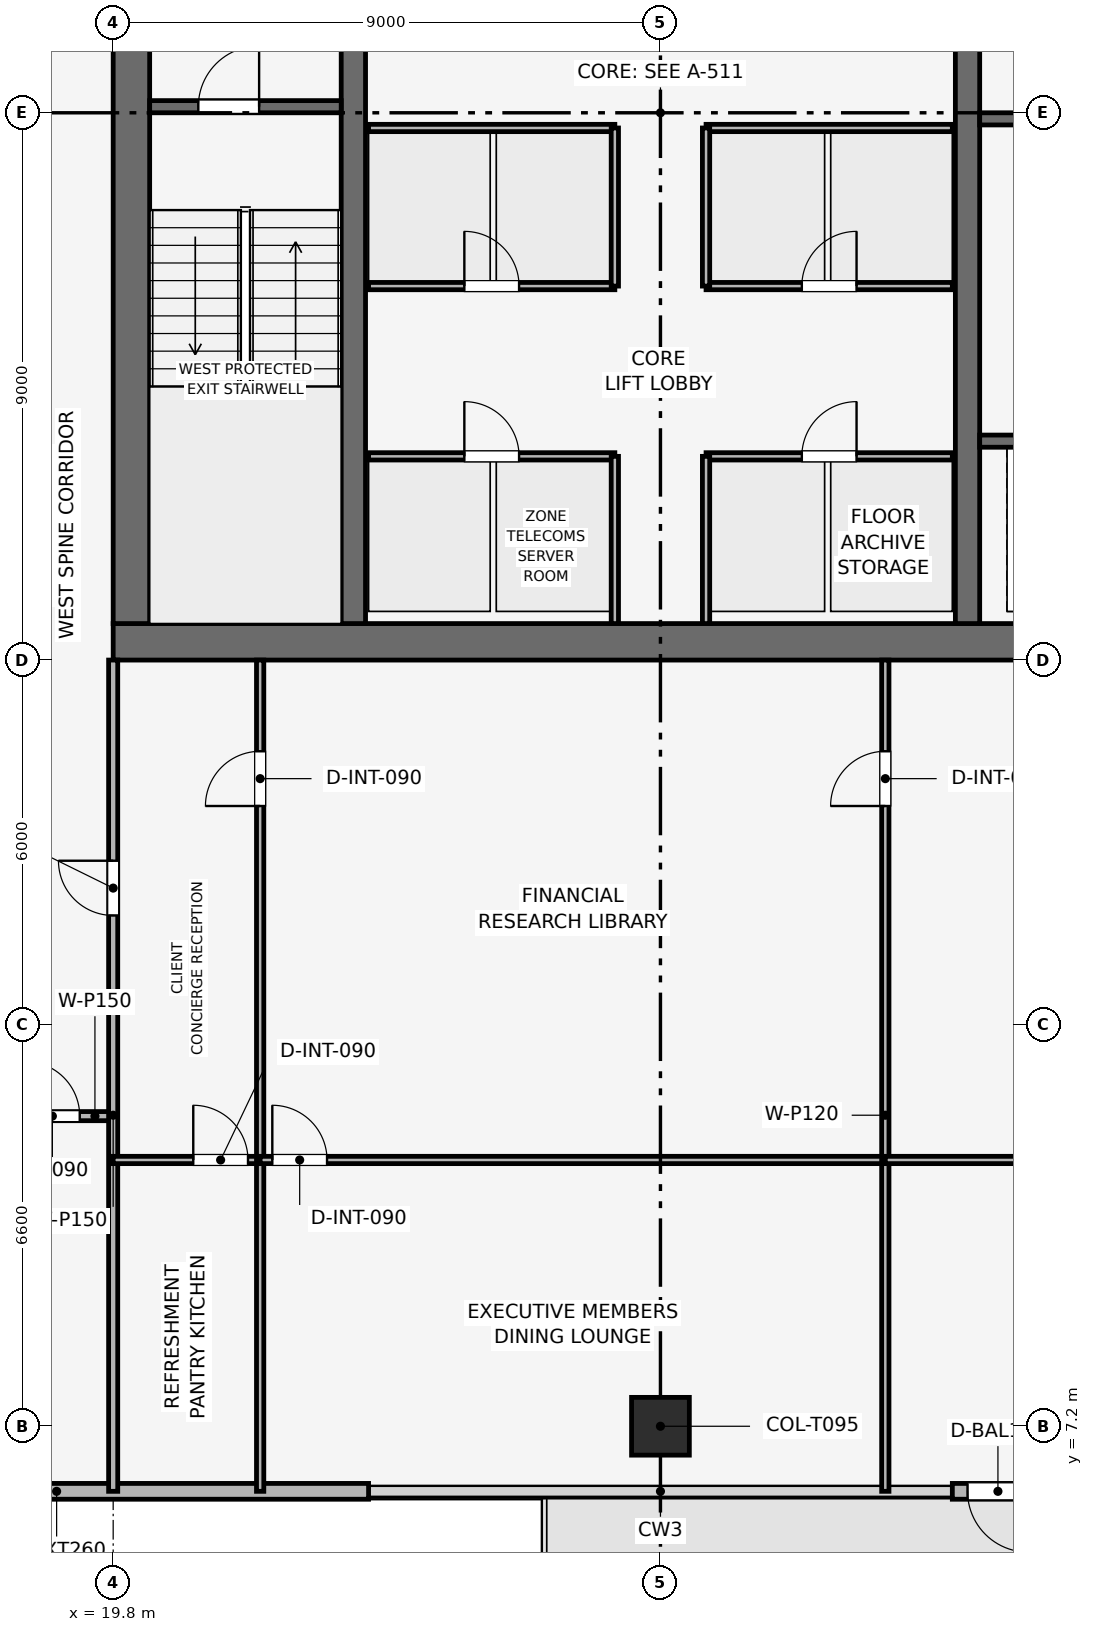
"""IFC4 building model, lengths in metres.
Left out: names, types, materials, properties, quantities, classifications, styles, units other than length and angle.
Written with IfcOpenShell. Run it as: python <this file> out.ifc"""

import sys

from ifc_helpers import new_model, si_unit, direction, frame, frame_2d, origin, origin_2d, place, context, subcontext, project, spatial, rectangle, extrude, element, fill, save


model = new_model("IFC4")
c1 = context("Model", 3, precision=1e-05, world=origin(), true_north=direction((0.0, 1.0)))
c2 = subcontext(c1, "Body", "Model", "MODEL_VIEW")
j1 = project(units=[si_unit("LENGTHUNIT", "METRE"), si_unit("PLANEANGLEUNIT", "RADIAN")], contexts=[c1])
p1 = place(None, origin())
s1 = spatial("IfcSite", under=j1, at=p1, CompositionType="ELEMENT")
p2 = place(p1, origin())
s2 = spatial("IfcBuilding", under=s1, at=p2, CompositionType="ELEMENT")
p3 = place(p2, frame((0.0, 0.0, 310.5)))
s3 = spatial("IfcBuildingStorey", under=s2, at=p3, CompositionType="ELEMENT", Elevation=310.5)
p4 = place(p3, frame((19.8, 20.1, 0.0), z_axis=(0.0, 0.0, 1.0), x_axis=(1.0, 0.0, 0.0)))
e1 = element("IfcWall", 1, at=p4, inside=s3, PredefinedType="SHEAR", context=c2, shape_type="SweptSolid", body=[
    extrude(rectangle(XDim=18.0, YDim=0.6, at=frame_2d((9.0, 0.0))), origin(), (0.0, 0.0, 1.0), 3.75),
])
p5 = place(p3, frame((20.1, 20.4, 0.0), z_axis=(0.0, 0.0, 1.0), x_axis=(0.0, 1.0, 0.0)))
e2 = element("IfcWall", 2, at=p5, inside=s3, PredefinedType="SHEAR", context=c2, shape_type="SweptSolid", body=[
    extrude(rectangle(XDim=16.8, YDim=0.6, at=frame_2d((8.4, 0.0))), origin(), (0.0, 0.0, 1.0), 3.75),
])
p6 = place(p5, frame((10.4, 0.0, 0.0)))
e3 = element("IfcOpeningElement", 3, at=p6, cuts=e2, PredefinedType="OPENING", context=c2, shape_type="SweptSolid", body=[
    extrude(rectangle(XDim=1.1, YDim=2.15, at=frame_2d((0.55, 1.075))), frame((0.0, 0.31, 0.0), z_axis=(0.0, -1.0, 0.0), x_axis=(1.0, 0.0, 0.0)), (0.0, 0.0, 1.0), 0.62),
])
for number, where, z_axis, x_axis in (
    (4, (23.75, 20.4, 0.0), (0.0, 0.0, 1.0), (0.0, 1.0, 0.0)),
    (5, (33.85, 20.4, 0.0), (0.0, 0.0, 1.0), (0.0, 1.0, 0.0)),
):
    element("IfcWall", number, at=place(p3, frame(where, z_axis=z_axis, x_axis=x_axis)), inside=s3, PredefinedType="SHEAR", context=c2, shape_type="SweptSolid", body=[
        extrude(rectangle(XDim=16.8, YDim=0.4, at=frame_2d((8.4, 0.0))), origin(), (0.0, 0.0, 1.0), 3.75),
    ])
p7 = place(p3, frame((28.8, 7.2, 0.003), z_axis=(0.0, 0.0, 1.0), x_axis=(1.0, 0.0, 0.0)))
e6 = element("IfcColumn", 6, at=p7, inside=s3, PredefinedType="COLUMN", context=c2, shape_type="SweptSolid", body=[
    extrude(rectangle(XDim=0.95, YDim=0.95, at=origin_2d()), origin(), (0.0, 0.0, 1.0), 3.504),
])
p8 = place(p3, frame((45.3, 6.13, 0.0), z_axis=(0.0, 0.0, 1.0), x_axis=(-1.0, 0.0, 0.0)))
e7 = element("IfcWall", 7, at=p8, inside=s3, PredefinedType="SOLIDWALL", context=c2, shape_type="SweptSolid", body=[
    extrude(rectangle(XDim=11.7, YDim=0.26, at=frame_2d((5.85, 0.0))), origin(), (0.0, 0.0, 1.0), 3.51),
])
p9 = place(p8, frame((10.45, 0.0, 0.0)))
e8 = element("IfcOpeningElement", 8, at=p9, cuts=e7, PredefinedType="OPENING", context=c2, shape_type="SweptSolid", body=[
    extrude(rectangle(XDim=1.0, YDim=2.2, at=frame_2d((0.5, 1.1))), frame((0.0, 0.14, 0.0), z_axis=(0.0, -1.0, 0.0), x_axis=(1.0, 0.0, 0.0)), (0.0, 0.0, 1.0), 0.28),
])
p10 = place(p3, frame((24.0, 6.13, 0.0), z_axis=(0.0, 0.0, 1.0), x_axis=(-1.0, 0.0, 0.0)))
e9 = element("IfcWall", 9, at=p10, inside=s3, PredefinedType="SOLIDWALL", context=c2, shape_type="SweptSolid", body=[
    extrude(rectangle(XDim=11.7, YDim=0.26, at=frame_2d((5.85, 0.0))), origin(), (0.0, 0.0, 1.0), 3.51),
])
p11 = place(p10, frame((5.964, 0.0, 0.9)))
e10 = element("IfcOpeningElement", 10, at=p11, cuts=e9, PredefinedType="OPENING", context=c2, shape_type="SweptSolid", body=[
    extrude(rectangle(XDim=1.2, YDim=2.1, at=frame_2d((0.6, 1.05))), frame((0.0, 0.14, 0.0), z_axis=(0.0, -1.0, 0.0), x_axis=(1.0, 0.0, 0.0)), (0.0, 0.0, 1.0), 0.28),
])
p12 = place(p3, frame((20.4, 28.9, 0.0), z_axis=(0.0, 0.0, 1.0), x_axis=(1.0, 0.0, 0.0)))
e11 = element("IfcWall", 11, at=p12, inside=s3, PredefinedType="SHEAR", context=c2, shape_type="SweptSolid", body=[
    extrude(rectangle(XDim=3.15, YDim=0.2, at=frame_2d((1.575, 0.0))), origin(), (0.0, 0.0, 1.0), 3.51),
])
p13 = place(p12, frame((0.8, 0.0, 0.0)))
e12 = element("IfcOpeningElement", 12, at=p13, cuts=e11, PredefinedType="OPENING", context=c2, shape_type="SweptSolid", body=[
    extrude(rectangle(XDim=1.0, YDim=2.1, at=frame_2d((0.5, 1.05))), frame((0.0, 0.11, 0.0), z_axis=(0.0, -1.0, 0.0), x_axis=(1.0, 0.0, 0.0)), (0.0, 0.0, 1.0), 0.22),
])
p14 = place(p3, frame((34.05, 28.7, 0.0), z_axis=(0.0, 0.0, 1.0), x_axis=(1.0, 0.0, 0.0)))
e13 = element("IfcWall", 13, at=p14, inside=s3, PredefinedType="SHEAR", context=c2, shape_type="SweptSolid", body=[
    extrude(rectangle(XDim=3.15, YDim=0.2, at=frame_2d((1.575, 0.0))), origin(), (0.0, 0.0, 1.0), 3.51),
])
p15 = place(p14, frame((0.8, 0.0, 0.0)))
e14 = element("IfcOpeningElement", 14, at=p15, cuts=e13, PredefinedType="OPENING", context=c2, shape_type="SweptSolid", body=[
    extrude(rectangle(XDim=1.0, YDim=2.1, at=frame_2d((0.5, 1.05))), frame((0.0, 0.11, 0.0), z_axis=(0.0, -1.0, 0.0), x_axis=(1.0, 0.0, 0.0)), (0.0, 0.0, 1.0), 0.22),
])
p16 = place(p3, frame((34.05, 23.4, 0.0), z_axis=(0.0, 0.0, 1.0), x_axis=(1.0, 0.0, 0.0)))
e15 = element("IfcWall", 15, at=p16, inside=s3, PredefinedType="SHEAR", context=c2, shape_type="SweptSolid", body=[
    extrude(rectangle(XDim=3.05, YDim=0.2, at=frame_2d((1.525, 0.0))), origin(), (0.0, 0.0, 1.0), 3.51),
])
p17 = place(p16, frame((1.2, 0.0, 0.0)))
e16 = element("IfcOpeningElement", 16, at=p17, cuts=e15, PredefinedType="OPENING", context=c2, shape_type="SweptSolid", body=[
    extrude(rectangle(XDim=1.1, YDim=2.15, at=frame_2d((0.55, 1.075))), frame((0.0, 0.11, 0.0), z_axis=(0.0, -1.0, 0.0), x_axis=(1.0, 0.0, 0.0)), (0.0, 0.0, 1.0), 0.22),
])
p18 = place(p3, frame((24.0, 23.15, 0.0), z_axis=(0.0, 0.0, 1.0), x_axis=(1.0, 0.0, 0.0)))
e17 = element("IfcWall", 17, at=p18, inside=s3, PredefinedType="PARTITIONING", context=c2, shape_type="SweptSolid", body=[
    extrude(rectangle(XDim=4.05, YDim=0.12, at=frame_2d((2.025, 0.0))), origin(), (0.0, 0.0, 1.0), 3.51),
])
p19 = place(p18, frame((1.575, 0.0, 0.0)))
e18 = element("IfcOpeningElement", 18, at=p19, cuts=e17, PredefinedType="OPENING", context=c2, shape_type="SweptSolid", body=[
    extrude(rectangle(XDim=0.9, YDim=2.1, at=frame_2d((0.45, 1.05))), frame((0.0, 0.07, 0.0), z_axis=(0.0, -1.0, 0.0), x_axis=(1.0, 0.0, 0.0)), (0.0, 0.0, 1.0), 0.14),
])
p20 = place(p3, frame((28.05, 20.4, 0.0), z_axis=(0.0, 0.0, 1.0), x_axis=(0.0, 1.0, 0.0)))
e19 = element("IfcWall", 19, at=p20, inside=s3, PredefinedType="PARTITIONING", context=c2, shape_type="SweptSolid", body=[
    extrude(rectangle(XDim=2.75, YDim=0.12, at=frame_2d((1.375, 0.0))), origin(), (0.0, 0.0, 1.0), 3.51),
])
p21 = place(p3, frame((29.55, 23.15, 0.0), z_axis=(0.0, 0.0, 1.0), x_axis=(1.0, 0.0, 0.0)))
e20 = element("IfcWall", 20, at=p21, inside=s3, PredefinedType="PARTITIONING", context=c2, shape_type="SweptSolid", body=[
    extrude(rectangle(XDim=4.05, YDim=0.12, at=frame_2d((2.025, 0.0))), origin(), (0.0, 0.0, 1.0), 3.51),
])
p22 = place(p21, frame((1.575, 0.0, 0.0)))
e21 = element("IfcOpeningElement", 21, at=p22, cuts=e20, PredefinedType="OPENING", context=c2, shape_type="SweptSolid", body=[
    extrude(rectangle(XDim=0.9, YDim=2.1, at=frame_2d((0.45, 1.05))), frame((0.0, 0.07, 0.0), z_axis=(0.0, -1.0, 0.0), x_axis=(1.0, 0.0, 0.0)), (0.0, 0.0, 1.0), 0.14),
])
p23 = place(p3, frame((29.55, 20.4, 0.0), z_axis=(0.0, 0.0, 1.0), x_axis=(0.0, 1.0, 0.0)))
e22 = element("IfcWall", 22, at=p23, inside=s3, PredefinedType="PARTITIONING", context=c2, shape_type="SweptSolid", body=[
    extrude(rectangle(XDim=2.75, YDim=0.12, at=frame_2d((1.375, 0.0))), origin(), (0.0, 0.0, 1.0), 3.51),
])
p24 = place(p3, frame((24.0, 25.95, 0.0), z_axis=(0.0, 0.0, 1.0), x_axis=(1.0, 0.0, 0.0)))
e23 = element("IfcWall", 23, at=p24, inside=s3, PredefinedType="PARTITIONING", context=c2, shape_type="SweptSolid", body=[
    extrude(rectangle(XDim=4.05, YDim=0.12, at=frame_2d((2.025, 0.0))), origin(), (0.0, 0.0, 1.0), 3.51),
])
p25 = place(p24, frame((1.575, 0.0, 0.0)))
e24 = element("IfcOpeningElement", 24, at=p25, cuts=e23, PredefinedType="OPENING", context=c2, shape_type="SweptSolid", body=[
    extrude(rectangle(XDim=0.9, YDim=2.1, at=frame_2d((0.45, 1.05))), frame((0.0, 0.07, 0.0), z_axis=(0.0, -1.0, 0.0), x_axis=(1.0, 0.0, 0.0)), (0.0, 0.0, 1.0), 0.14),
])
p26 = place(p3, frame((24.0, 28.55, 0.0), z_axis=(0.0, 0.0, 1.0), x_axis=(1.0, 0.0, 0.0)))
e25 = element("IfcWall", 25, at=p26, inside=s3, PredefinedType="PARTITIONING", context=c2, shape_type="SweptSolid", body=[
    extrude(rectangle(XDim=4.05, YDim=0.12, at=frame_2d((2.025, 0.0))), origin(), (0.0, 0.0, 1.0), 3.51),
])
p27 = place(p3, frame((28.05, 25.95, 0.0), z_axis=(0.0, 0.0, 1.0), x_axis=(0.0, 1.0, 0.0)))
e26 = element("IfcWall", 26, at=p27, inside=s3, PredefinedType="PARTITIONING", context=c2, shape_type="SweptSolid", body=[
    extrude(rectangle(XDim=2.6, YDim=0.12, at=frame_2d((1.3, 0.0))), origin(), (0.0, 0.0, 1.0), 3.51),
])
p28 = place(p3, frame((29.55, 25.95, 0.0), z_axis=(0.0, 0.0, 1.0), x_axis=(1.0, 0.0, 0.0)))
e27 = element("IfcWall", 27, at=p28, inside=s3, PredefinedType="PARTITIONING", context=c2, shape_type="SweptSolid", body=[
    extrude(rectangle(XDim=4.05, YDim=0.12, at=frame_2d((2.025, 0.0))), origin(), (0.0, 0.0, 1.0), 3.51),
])
p29 = place(p28, frame((1.575, 0.0, 0.0)))
e28 = element("IfcOpeningElement", 28, at=p29, cuts=e27, PredefinedType="OPENING", context=c2, shape_type="SweptSolid", body=[
    extrude(rectangle(XDim=0.9, YDim=2.1, at=frame_2d((0.45, 1.05))), frame((0.0, 0.07, 0.0), z_axis=(0.0, -1.0, 0.0), x_axis=(1.0, 0.0, 0.0)), (0.0, 0.0, 1.0), 0.14),
])
p30 = place(p3, frame((29.55, 28.55, 0.0), z_axis=(0.0, 0.0, 1.0), x_axis=(1.0, 0.0, 0.0)))
e29 = element("IfcWall", 29, at=p30, inside=s3, PredefinedType="PARTITIONING", context=c2, shape_type="SweptSolid", body=[
    extrude(rectangle(XDim=4.05, YDim=0.12, at=frame_2d((2.025, 0.0))), origin(), (0.0, 0.0, 1.0), 3.51),
])
p31 = place(p3, frame((29.55, 25.95, 0.0), z_axis=(0.0, 0.0, 1.0), x_axis=(0.0, 1.0, 0.0)))
e30 = element("IfcWall", 30, at=p31, inside=s3, PredefinedType="PARTITIONING", context=c2, shape_type="SweptSolid", body=[
    extrude(rectangle(XDim=2.6, YDim=0.12, at=frame_2d((1.3, 0.0))), origin(), (0.0, 0.0, 1.0), 3.51),
])
p32 = place(p3, frame((17.9, 12.3, 0.0), z_axis=(0.0, 0.0, 1.0), x_axis=(1.0, 0.0, 0.0)))
e31 = element("IfcWall", 31, at=p32, inside=s3, PredefinedType="PARTITIONING", context=c2, shape_type="SweptSolid", body=[
    extrude(rectangle(XDim=1.9, YDim=0.15, at=frame_2d((0.95, 0.0))), origin(), (0.0, 0.0, 1.0), 3.51),
])
p33 = place(p32, frame((0.45, 0.0, 0.0)))
e32 = element("IfcOpeningElement", 32, at=p33, cuts=e31, PredefinedType="OPENING", context=c2, shape_type="SweptSolid", body=[
    extrude(rectangle(XDim=0.9, YDim=2.1, at=frame_2d((0.45, 1.05))), frame((0.0, 0.085, 0.0), z_axis=(0.0, -1.0, 0.0), x_axis=(1.0, 0.0, 0.0)), (0.0, 0.0, 1.0), 0.17),
])
p34 = place(p3, frame((19.8, 6.13, 0.0), z_axis=(0.0, 0.0, 1.0), x_axis=(0.0, 1.0, 0.0)))
e33 = element("IfcWall", 33, at=p34, inside=s3, PredefinedType="PARTITIONING", context=c2, shape_type="SweptSolid", body=[
    extrude(rectangle(XDim=13.67, YDim=0.15, at=frame_2d((6.835, 0.0))), origin(), (0.0, 0.0, 1.0), 3.095),
])
p35 = place(p34, frame((9.47, 0.0, 0.0)))
e34 = element("IfcOpeningElement", 34, at=p35, cuts=e33, PredefinedType="OPENING", context=c2, shape_type="SweptSolid", body=[
    extrude(rectangle(XDim=0.9, YDim=2.1, at=frame_2d((0.45, 1.05))), frame((0.0, 0.085, 0.0), z_axis=(0.0, -1.0, 0.0), x_axis=(1.0, 0.0, 0.0)), (0.0, 0.0, 1.0), 0.17),
])
p36 = place(p3, frame((19.8, 11.579, 0.0), z_axis=(0.0, 0.0, 1.0), x_axis=(1.0, 0.0, 0.0)))
e35 = element("IfcWall", 35, at=p36, inside=s3, PredefinedType="PARTITIONING", context=c2, shape_type="SweptSolid", body=[
    extrude(rectangle(XDim=2.417, YDim=0.12, at=frame_2d((1.208, 0.0))), origin(), (0.0, 0.0, 1.0), 3.095),
])
p37 = place(p36, frame((1.317, 0.0, 0.0)))
e36 = element("IfcOpeningElement", 36, at=p37, cuts=e35, PredefinedType="OPENING", context=c2, shape_type="SweptSolid", body=[
    extrude(rectangle(XDim=0.9, YDim=2.1, at=frame_2d((0.45, 1.05))), frame((0.0, 0.07, 0.0), z_axis=(0.0, -1.0, 0.0), x_axis=(1.0, 0.0, 0.0)), (0.0, 0.0, 1.0), 0.14),
])
p38 = place(p3, frame((22.217, 6.13, 0.0), z_axis=(0.0, 0.0, 1.0), x_axis=(0.0, 1.0, 0.0)))
e37 = element("IfcWall", 37, at=p38, inside=s3, PredefinedType="PARTITIONING", context=c2, shape_type="SweptSolid", body=[
    extrude(rectangle(XDim=13.67, YDim=0.12, at=frame_2d((6.835, 0.0))), origin(), (0.0, 0.0, 1.0), 3.135),
])
p39 = place(p38, frame((11.27, 0.0, 0.0)))
e38 = element("IfcOpeningElement", 38, at=p39, cuts=e37, PredefinedType="OPENING", context=c2, shape_type="SweptSolid", body=[
    extrude(rectangle(XDim=0.9, YDim=2.1, at=frame_2d((0.45, 1.05))), frame((0.0, 0.07, 0.0), z_axis=(0.0, -1.0, 0.0), x_axis=(1.0, 0.0, 0.0)), (0.0, 0.0, 1.0), 0.14),
])
p40 = place(p3, frame((22.217, 11.579, 0.0), z_axis=(0.0, 0.0, 1.0), x_axis=(1.0, 0.0, 0.0)))
e39 = element("IfcWall", 39, at=p40, inside=s3, PredefinedType="PARTITIONING", context=c2, shape_type="SweptSolid", body=[
    extrude(rectangle(XDim=10.281, YDim=0.12, at=frame_2d((5.141, 0.0))), origin(), (0.0, 0.0, 1.0), 3.095),
])
p41 = place(p40, frame((0.2, 0.0, 0.0)))
e40 = element("IfcOpeningElement", 40, at=p41, cuts=e39, PredefinedType="OPENING", context=c2, shape_type="SweptSolid", body=[
    extrude(rectangle(XDim=0.9, YDim=2.1, at=frame_2d((0.45, 1.05))), frame((0.0, 0.07, 0.0), z_axis=(0.0, -1.0, 0.0), x_axis=(1.0, 0.0, 0.0)), (0.0, 0.0, 1.0), 0.14),
])
p42 = place(p3, frame((32.498, 6.13, 0.0), z_axis=(0.0, 0.0, 1.0), x_axis=(0.0, 1.0, 0.0)))
e41 = element("IfcWall", 41, at=p42, inside=s3, PredefinedType="PARTITIONING", context=c2, shape_type="SweptSolid", body=[
    extrude(rectangle(XDim=13.67, YDim=0.12, at=frame_2d((6.835, 0.0))), origin(), (0.0, 0.0, 1.0), 3.135),
])
p43 = place(p42, frame((11.27, 0.0, 0.0)))
e42 = element("IfcOpeningElement", 42, at=p43, cuts=e41, PredefinedType="OPENING", context=c2, shape_type="SweptSolid", body=[
    extrude(rectangle(XDim=0.9, YDim=2.1, at=frame_2d((0.45, 1.05))), frame((0.0, 0.07, 0.0), z_axis=(0.0, -1.0, 0.0), x_axis=(1.0, 0.0, 0.0)), (0.0, 0.0, 1.0), 0.14),
])
p44 = place(p3, frame((32.498, 11.579, 0.0), z_axis=(0.0, 0.0, 1.0), x_axis=(1.0, 0.0, 0.0)))
e43 = element("IfcWall", 43, at=p44, inside=s3, PredefinedType="PARTITIONING", context=c2, shape_type="SweptSolid", body=[
    extrude(rectangle(XDim=12.802, YDim=0.12, at=frame_2d((6.401, 0.0))), origin(), (0.0, 0.0, 1.0), 3.095),
])
p45 = place(p44, frame((2.596, 0.0, 0.0)))
e44 = element("IfcOpeningElement", 44, at=p45, cuts=e43, PredefinedType="OPENING", context=c2, shape_type="SweptSolid", body=[
    extrude(rectangle(XDim=0.9, YDim=2.1, at=frame_2d((0.45, 1.05))), frame((0.0, 0.07, 0.0), z_axis=(0.0, -1.0, 0.0), x_axis=(1.0, 0.0, 0.0)), (0.0, 0.0, 1.0), 0.14),
])
p46 = place(p9, origin())
e45 = element("IfcDoor", 45, at=p46, inside=s3, OperationType="SINGLE_SWING_LEFT", PredefinedType="DOOR", context=c2, shape_type="SweptSolid", body=[
    extrude(rectangle(XDim=1.0, YDim=2.2, at=frame_2d((0.5, 1.1))), frame((0.0, 0.025, 0.0), z_axis=(0.0, -1.0, 0.0), x_axis=(1.0, 0.0, 0.0)), (0.0, 0.0, 1.0), 0.05),
])
fill(e8, e45)
p47 = place(p13, origin())
e46 = element("IfcDoor", 46, at=p47, inside=s3, OperationType="SINGLE_SWING_RIGHT", PredefinedType="DOOR", context=c2, shape_type="SweptSolid", body=[
    extrude(rectangle(XDim=1.0, YDim=2.1, at=frame_2d((0.5, 1.05))), frame((0.0, 0.025, 0.0), z_axis=(0.0, -1.0, 0.0), x_axis=(1.0, 0.0, 0.0)), (0.0, 0.0, 1.0), 0.05),
])
fill(e12, e46)
p48 = place(p19, origin())
e47 = element("IfcDoor", 47, at=p48, inside=s3, OperationType="SINGLE_SWING_LEFT", PredefinedType="DOOR", context=c2, shape_type="SweptSolid", body=[
    extrude(rectangle(XDim=0.9, YDim=2.1, at=frame_2d((0.45, 1.05))), frame((0.0, 0.025, 0.0), z_axis=(0.0, -1.0, 0.0), x_axis=(1.0, 0.0, 0.0)), (0.0, 0.0, 1.0), 0.05),
])
fill(e18, e47)
p49 = place(p22, origin())
e48 = element("IfcDoor", 48, at=p49, inside=s3, OperationType="SINGLE_SWING_RIGHT", PredefinedType="DOOR", context=c2, shape_type="SweptSolid", body=[
    extrude(rectangle(XDim=0.9, YDim=2.1, at=frame_2d((0.45, 1.05))), frame((0.0, 0.025, 0.0), z_axis=(0.0, -1.0, 0.0), x_axis=(1.0, 0.0, 0.0)), (0.0, 0.0, 1.0), 0.05),
])
fill(e21, e48)
p50 = place(p25, origin())
e49 = element("IfcDoor", 49, at=p50, inside=s3, OperationType="SINGLE_SWING_LEFT", PredefinedType="DOOR", context=c2, shape_type="SweptSolid", body=[
    extrude(rectangle(XDim=0.9, YDim=2.1, at=frame_2d((0.45, 1.05))), frame((0.0, 0.025, 0.0), z_axis=(0.0, -1.0, 0.0), x_axis=(1.0, 0.0, 0.0)), (0.0, 0.0, 1.0), 0.05),
])
fill(e24, e49)
p51 = place(p29, origin())
e50 = element("IfcDoor", 50, at=p51, inside=s3, OperationType="SINGLE_SWING_RIGHT", PredefinedType="DOOR", context=c2, shape_type="SweptSolid", body=[
    extrude(rectangle(XDim=0.9, YDim=2.1, at=frame_2d((0.45, 1.05))), frame((0.0, 0.025, 0.0), z_axis=(0.0, -1.0, 0.0), x_axis=(1.0, 0.0, 0.0)), (0.0, 0.0, 1.0), 0.05),
])
fill(e28, e50)
p52 = place(p33, origin())
e51 = element("IfcDoor", 51, at=p52, inside=s3, OperationType="SINGLE_SWING_LEFT", PredefinedType="DOOR", context=c2, shape_type="SweptSolid", body=[
    extrude(rectangle(XDim=0.9, YDim=2.1, at=frame_2d((0.45, 1.05))), frame((0.0, 0.025, 0.0), z_axis=(0.0, -1.0, 0.0), x_axis=(1.0, 0.0, 0.0)), (0.0, 0.0, 1.0), 0.05),
])
fill(e32, e51)
p53 = place(p35, origin())
e52 = element("IfcDoor", 52, at=p53, inside=s3, OperationType="SINGLE_SWING_RIGHT", PredefinedType="DOOR", context=c2, shape_type="SweptSolid", body=[
    extrude(rectangle(XDim=0.9, YDim=2.1, at=frame_2d((0.45, 1.05))), frame((0.0, 0.025, 0.0), z_axis=(0.0, -1.0, 0.0), x_axis=(1.0, 0.0, 0.0)), (0.0, 0.0, 1.0), 0.05),
])
fill(e34, e52)
p54 = place(p37, origin())
e53 = element("IfcDoor", 53, at=p54, inside=s3, OperationType="SINGLE_SWING_LEFT", PredefinedType="DOOR", context=c2, shape_type="SweptSolid", body=[
    extrude(rectangle(XDim=0.9, YDim=2.1, at=frame_2d((0.45, 1.05))), frame((0.0, 0.025, 0.0), z_axis=(0.0, -1.0, 0.0), x_axis=(1.0, 0.0, 0.0)), (0.0, 0.0, 1.0), 0.05),
])
fill(e36, e53)
p55 = place(p39, origin())
e54 = element("IfcDoor", 54, at=p55, inside=s3, OperationType="SINGLE_SWING_LEFT", PredefinedType="DOOR", context=c2, shape_type="SweptSolid", body=[
    extrude(rectangle(XDim=0.9, YDim=2.1, at=frame_2d((0.45, 1.05))), frame((0.0, 0.025, 0.0), z_axis=(0.0, -1.0, 0.0), x_axis=(1.0, 0.0, 0.0)), (0.0, 0.0, 1.0), 0.05),
])
fill(e38, e54)
p56 = place(p41, origin())
e55 = element("IfcDoor", 55, at=p56, inside=s3, OperationType="SINGLE_SWING_LEFT", PredefinedType="DOOR", context=c2, shape_type="SweptSolid", body=[
    extrude(rectangle(XDim=0.9, YDim=2.1, at=frame_2d((0.45, 1.05))), frame((0.0, 0.025, 0.0), z_axis=(0.0, -1.0, 0.0), x_axis=(1.0, 0.0, 0.0)), (0.0, 0.0, 1.0), 0.05),
])
fill(e40, e55)
p57 = place(p43, origin())
e56 = element("IfcDoor", 56, at=p57, inside=s3, OperationType="SINGLE_SWING_LEFT", PredefinedType="DOOR", context=c2, shape_type="SweptSolid", body=[
    extrude(rectangle(XDim=0.9, YDim=2.1, at=frame_2d((0.45, 1.05))), frame((0.0, 0.025, 0.0), z_axis=(0.0, -1.0, 0.0), x_axis=(1.0, 0.0, 0.0)), (0.0, 0.0, 1.0), 0.05),
])
fill(e42, e56)
save(model, sys.argv[1])
